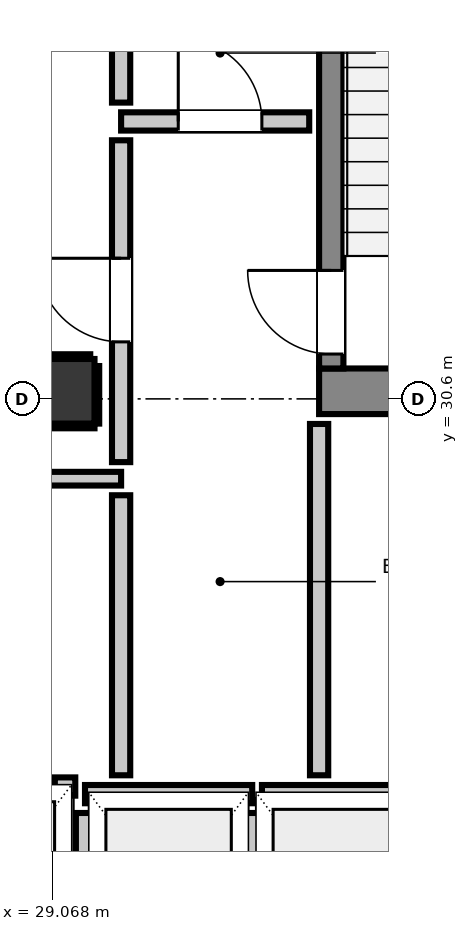
"""IFC4 building model, lengths in metres.
Left out: names, types, materials, properties, quantities, classifications, styles, units other than length and angle.
Written with IfcOpenShell. Run it as: python <this file> out.ifc"""

import sys

from ifc_helpers import new_model, si_unit, direction, frame, frame_2d, origin, origin_2d, place, context, subcontext, project, spatial, rectangle, extrude, element, fill, save


model = new_model("IFC4")
c1 = context("Model", 3, precision=1e-05, world=origin(), true_north=direction((0.0, 1.0)))
c2 = subcontext(c1, "Body", "Model", "MODEL_VIEW")
j1 = project(units=[si_unit("LENGTHUNIT", "METRE"), si_unit("PLANEANGLEUNIT", "RADIAN")], contexts=[c1])
p1 = place(None, origin())
s1 = spatial("IfcSite", under=j1, at=p1, CompositionType="ELEMENT")
p2 = place(p1, origin())
s2 = spatial("IfcBuilding", under=s1, at=p2, CompositionType="ELEMENT")
p3 = place(p2, frame((0.0, 0.0, 244.56)))
s3 = spatial("IfcBuildingStorey", under=s2, at=p3, CompositionType="ELEMENT", Elevation=244.56)
p4 = place(p3, frame((32.58, 30.7, 0.0), z_axis=(0.0, 0.0, 1.0), x_axis=(1.0, 0.0, 0.0)))
e1 = element("IfcWall", 1, at=p4, inside=s3, PredefinedType="SHEAR", context=c2, shape_type="SweptSolid", body=[
    extrude(rectangle(XDim=3.54, YDim=0.6, at=frame_2d((1.77, 0.0))), origin(), (0.0, 0.0, 1.0), 3.32),
])
p5 = place(p3, frame((32.74, 31.0, 0.0), z_axis=(0.0, 0.0, 1.0), x_axis=(0.0, 1.0, 0.0)))
e2 = element("IfcWall", 2, at=p5, inside=s3, PredefinedType="SHEAR", context=c2, shape_type="SweptSolid", body=[
    extrude(rectangle(XDim=7.8, YDim=0.32, at=frame_2d((3.9, 0.0))), origin(), (0.0, 0.0, 1.0), 3.32),
])
p6 = place(p5, frame((0.19, 0.0, 0.0)))
e3 = element("IfcOpeningElement", 3, at=p6, cuts=e2, PredefinedType="OPENING", context=c2, shape_type="SweptSolid", body=[
    extrude(rectangle(XDim=1.1, YDim=2.15, at=frame_2d((0.55, 1.075))), frame((0.0, 0.17, 0.0), z_axis=(0.0, -1.0, 0.0), x_axis=(1.0, 0.0, 0.0)), (0.0, 0.0, 1.0), 0.34),
])
p7 = place(p3, frame((29.2, 30.7, 0.0), z_axis=(0.0, 0.0, 1.0), x_axis=(1.0, 0.0, 0.0)))
e4 = element("IfcColumn", 4, at=p7, inside=s3, PredefinedType="COLUMN", context=c2, shape_type="SweptSolid", body=[
    extrude(rectangle(XDim=0.85, YDim=0.85, at=origin_2d()), origin(), (0.0, 0.0, 1.0), 3.32),
])
p8 = place(p3, frame((29.5, 25.4, 0.0), z_axis=(0.0, 0.0, 1.0), x_axis=(1.0, 0.0, 0.0)))
e5 = element("IfcWall", 5, at=p8, inside=s3, PredefinedType="PARTITIONING", context=c2, shape_type="SweptSolid", body=[
    extrude(rectangle(XDim=2.2, YDim=0.24, at=frame_2d((1.1, 0.0))), origin(), (0.0, 0.0, 1.0), 3.1),
])
p9 = place(p3, frame((29.5, 22.848, 0.0), z_axis=(0.0, 0.0, 1.0), x_axis=(0.0, 1.0, 0.0)))
e6 = element("IfcWall", 6, at=p9, inside=s3, PredefinedType="PARTITIONING", context=c2, shape_type="SweptSolid", body=[
    extrude(rectangle(XDim=2.304, YDim=0.24, at=frame_2d((1.152, 0.0))), origin(), (0.0, 0.0, 1.0), 2.335),
])
p10 = place(p3, frame((31.7, 22.848, 0.0), z_axis=(0.0, 0.0, 1.0), x_axis=(0.0, 1.0, 0.0)))
e7 = element("IfcWall", 7, at=p10, inside=s3, PredefinedType="PARTITIONING", context=c2, shape_type="SweptSolid", body=[
    extrude(rectangle(XDim=2.304, YDim=0.24, at=frame_2d((1.152, 0.0))), origin(), (0.0, 0.0, 1.0), 3.1),
])
p11 = place(p3, frame((31.828, 25.4, 0.0), z_axis=(0.0, 0.0, 1.0), x_axis=(1.0, 0.0, 0.0)))
e8 = element("IfcWall", 8, at=p11, inside=s3, PredefinedType="PARTITIONING", context=c2, shape_type="SweptSolid", body=[
    extrude(rectangle(XDim=2.072, YDim=0.24, at=frame_2d((1.036, 0.0))), origin(), (0.0, 0.0, 1.0), 3.1),
])
p12 = place(p3, frame((29.103, 25.5, 0.0), z_axis=(0.0, 0.0, 1.0), x_axis=(1.0, 0.0, 0.0)))
e9 = element("IfcWall", 9, at=p12, inside=s3, PredefinedType="PARTITIONING", context=c2, shape_type="SweptSolid", body=[
    extrude(rectangle(XDim=0.269, YDim=0.24, at=frame_2d((0.135, 0.0))), origin(), (0.0, 0.0, 1.0), 3.1),
])
p13 = place(p3, frame((29.975, 34.25, 0.0), z_axis=(0.0, 0.0, 1.0), x_axis=(1.0, 0.0, 0.0)))
e10 = element("IfcWall", 10, at=p13, inside=s3, PredefinedType="PARTITIONING", context=c2, shape_type="SweptSolid", body=[
    extrude(rectangle(XDim=2.475, YDim=0.24, at=frame_2d((1.237, 0.0))), origin(), (0.0, 0.0, 1.0), 3.1),
])
p14 = place(p13, frame((0.752, 0.0, 0.0)))
e11 = element("IfcOpeningElement", 11, at=p14, cuts=e10, PredefinedType="OPENING", context=c2, shape_type="SweptSolid", body=[
    extrude(rectangle(XDim=1.1, YDim=2.15, at=frame_2d((0.55, 1.075))), frame((0.0, 0.13, 0.0), z_axis=(0.0, -1.0, 0.0), x_axis=(1.0, 0.0, 0.0)), (0.0, 0.0, 1.0), 0.26),
])
p15 = place(p3, frame((28.593, 29.55, 0.0), z_axis=(0.0, 0.0, 1.0), x_axis=(1.0, 0.0, 0.0)))
e12 = element("IfcWall", 12, at=p15, inside=s3, PredefinedType="PARTITIONING", context=c2, shape_type="SweptSolid", body=[
    extrude(rectangle(XDim=1.382, YDim=0.18, at=frame_2d((0.691, 0.0))), origin(), (0.0, 0.0, 1.0), 3.1),
])
p16 = place(p3, frame((29.975, 25.648, 0.0), z_axis=(0.0, 0.0, 1.0), x_axis=(0.0, 1.0, 0.0)))
e13 = element("IfcWall", 13, at=p16, inside=s3, PredefinedType="PARTITIONING", context=c2, shape_type="SweptSolid", body=[
    extrude(rectangle(XDim=3.684, YDim=0.24, at=frame_2d((1.842, 0.0))), origin(), (0.0, 0.0, 1.0), 3.1),
])
p17 = place(p3, frame((29.975, 29.768, 0.0), z_axis=(0.0, 0.0, 1.0), x_axis=(0.0, 1.0, 0.0)))
e14 = element("IfcWall", 14, at=p17, inside=s3, PredefinedType="PARTITIONING", context=c2, shape_type="SweptSolid", body=[
    extrude(rectangle(XDim=4.234, YDim=0.24, at=frame_2d((2.117, 0.0))), origin(), (0.0, 0.0, 1.0), 3.1),
])
p18 = place(p17, frame((1.582, 0.0, 0.0)))
e15 = element("IfcOpeningElement", 15, at=p18, cuts=e14, PredefinedType="OPENING", context=c2, shape_type="SweptSolid", body=[
    extrude(rectangle(XDim=1.1, YDim=2.15, at=frame_2d((0.55, 1.075))), frame((0.0, 0.13, 0.0), z_axis=(0.0, -1.0, 0.0), x_axis=(1.0, 0.0, 0.0)), (0.0, 0.0, 1.0), 0.26),
])
p19 = place(p3, frame((29.975, 34.498, 0.0), z_axis=(0.0, 0.0, 1.0), x_axis=(0.0, 1.0, 0.0)))
e16 = element("IfcWall", 16, at=p19, inside=s3, PredefinedType="PARTITIONING", context=c2, shape_type="SweptSolid", body=[
    extrude(rectangle(XDim=0.924, YDim=0.24, at=frame_2d((0.462, 0.0))), origin(), (0.0, 0.0, 1.0), 3.1),
])
p20 = place(p3, frame((32.58, 25.648, 0.0), z_axis=(0.0, 0.0, 1.0), x_axis=(0.0, 1.0, 0.0)))
e17 = element("IfcWall", 17, at=p20, inside=s3, PredefinedType="PARTITIONING", context=c2, shape_type="SweptSolid", body=[
    extrude(rectangle(XDim=4.622, YDim=0.24, at=frame_2d((2.311, 0.0))), origin(), (0.0, 0.0, 1.0), 3.1),
])
p21 = place(p3, frame((28.775, 30.243, 0.0), z_axis=(0.0, 0.0, 1.0), x_axis=(1.0, 0.0, 0.0)))
e18 = element("IfcWall", 18, at=p21, inside=s3, PredefinedType="PARTITIONING", context=c2, shape_type="SweptSolid", body=[
    extrude(rectangle(XDim=0.85, YDim=0.06, at=frame_2d((0.425, 0.0))), origin(), (0.0, 0.0, 1.0), 1.45),
])
p22 = place(p3, frame((28.775, 31.157, 0.0), z_axis=(0.0, 0.0, 1.0), x_axis=(1.0, 0.0, 0.0)))
e19 = element("IfcWall", 19, at=p22, inside=s3, PredefinedType="PARTITIONING", context=c2, shape_type="SweptSolid", body=[
    extrude(rectangle(XDim=0.794, YDim=0.06, at=frame_2d((0.397, 0.0))), origin(), (0.0, 0.0, 1.0), 1.45),
])
p23 = place(p3, frame((29.657, 30.275, 0.0), z_axis=(0.0, 0.0, 1.0), x_axis=(0.0, 1.0, 0.0)))
e20 = element("IfcWall", 20, at=p23, inside=s3, PredefinedType="PARTITIONING", context=c2, shape_type="SweptSolid", body=[
    extrude(rectangle(XDim=0.757, YDim=0.06, at=frame_2d((0.378, 0.0))), origin(), (0.0, 0.0, 1.0), 1.45),
])
p24 = place(p6, origin())
e21 = element("IfcDoor", 21, at=p24, inside=s3, OperationType="SINGLE_SWING_RIGHT", PredefinedType="DOOR", context=c2, shape_type="SweptSolid", body=[
    extrude(rectangle(XDim=1.1, YDim=2.15, at=frame_2d((0.55, 1.075))), frame((0.0, 0.025, 0.0), z_axis=(0.0, -1.0, 0.0), x_axis=(1.0, 0.0, 0.0)), (0.0, 0.0, 1.0), 0.05),
])
fill(e3, e21)
p25 = place(p18, origin())
e22 = element("IfcDoor", 22, at=p25, inside=s3, OperationType="SINGLE_SWING_RIGHT", PredefinedType="DOOR", context=c2, shape_type="SweptSolid", body=[
    extrude(rectangle(XDim=1.1, YDim=2.15, at=frame_2d((0.55, 1.075))), frame((0.0, 0.025, 0.0), z_axis=(0.0, -1.0, 0.0), x_axis=(1.0, 0.0, 0.0)), (0.0, 0.0, 1.0), 0.05),
])
fill(e15, e22)
p26 = place(p14, origin())
e23 = element("IfcDoor", 23, at=p26, inside=s3, OperationType="SINGLE_SWING_LEFT", PredefinedType="DOOR", context=c2, shape_type="SweptSolid", body=[
    extrude(rectangle(XDim=1.1, YDim=2.15, at=frame_2d((0.55, 1.075))), frame((0.0, 0.025, 0.0), z_axis=(0.0, -1.0, 0.0), x_axis=(1.0, 0.0, 0.0)), (0.0, 0.0, 1.0), 0.05),
])
fill(e11, e23)
save(model, sys.argv[1])
